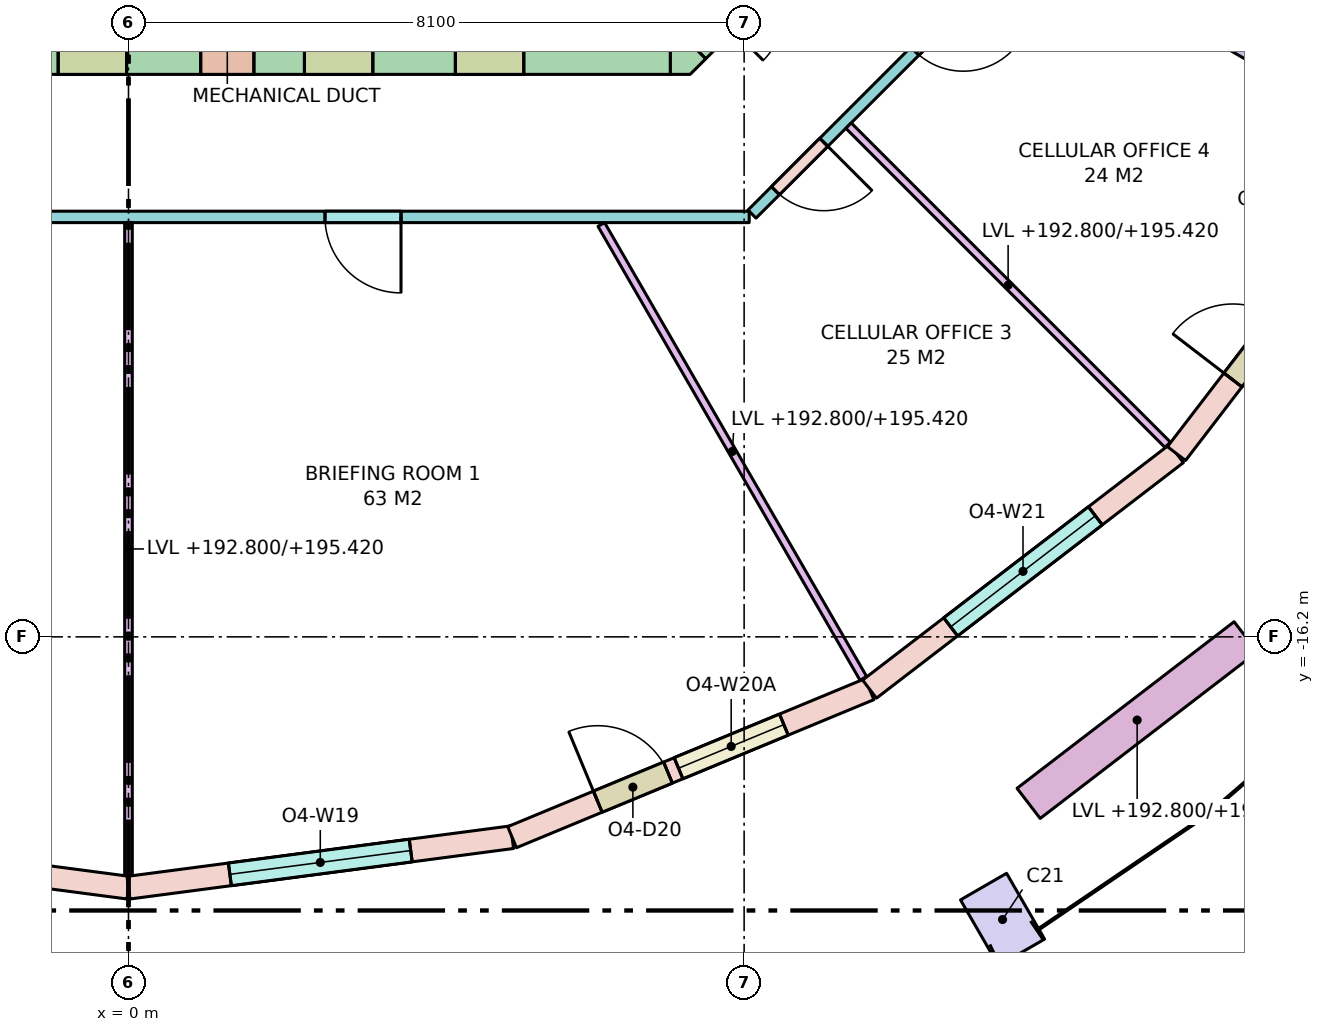
"""IFC4 building model, lengths in metres.
Left out: names, types, materials, properties, quantities, classifications, styles, units other than length and angle.
Written with IfcOpenShell. Run it as: python <this file> out.ifc"""

import sys

from ifc_helpers import new_model, si_unit, direction, frame, frame_2d, origin, origin_2d, place, context, subcontext, project, spatial, polyline, rectangle, outline, extrude, element, fill, save


model = new_model("IFC4")
c1 = context("Model", 3, precision=1e-05, world=origin(), true_north=direction((0.0, 1.0)))
c2 = subcontext(c1, "Body", "Model", "MODEL_VIEW")
j1 = project(units=[si_unit("LENGTHUNIT", "METRE"), si_unit("PLANEANGLEUNIT", "RADIAN")], contexts=[c1])
p1 = place(None, origin())
s1 = spatial("IfcSite", under=j1, at=p1, CompositionType="ELEMENT")
p2 = place(p1, origin())
s2 = spatial("IfcBuilding", under=s1, at=p2, CompositionType="ELEMENT")
p3 = place(p2, frame((0.0, 0.0, 192.8)))
s3 = spatial("IfcBuildingStorey", under=s2, at=p3, CompositionType="ELEMENT", Elevation=192.8)
p4 = place(p3, frame((11.5, -19.919, 0.0), z_axis=(0.0, 0.0, 1.0), x_axis=(0.866025403784, 0.5, 0.0)))
e1 = element("IfcColumn", 1, at=p4, inside=s3, PredefinedType="COLUMN", context=c2, shape_type="SweptSolid", body=[
    extrude(rectangle(XDim=0.7, YDim=1.0, at=origin_2d()), origin(), (0.0, 0.0, 1.0), 3.7),
])
p5 = place(p3, frame((-7.13, -8.45, -0.28), z_axis=(0.0, 0.0, 1.0), x_axis=(1.0, 0.0, 0.0)))
e2 = element("IfcWall", 2, at=p5, inside=s3, PredefinedType="SHEAR", context=c2, shape_type="SweptSolid", body=[
    extrude(rectangle(XDim=14.26, YDim=0.7, at=frame_2d((7.13, 0.0))), origin(), (0.0, 0.0, 1.0), 3.7),
])
p6 = place(p5, frame((8.08, 0.0, 0.28)))
e3 = element("IfcOpeningElement", 3, at=p6, cuts=e2, PredefinedType="OPENING", context=c2, shape_type="SweptSolid", body=[
    extrude(rectangle(XDim=0.7, YDim=2.1, at=frame_2d((0.35, 1.05))), frame((0.0, 0.36, 0.0), z_axis=(0.0, -1.0, 0.0), x_axis=(1.0, 0.0, 0.0)), (0.0, 0.0, 1.0), 0.72),
])
p7 = place(p5, frame((6.205, 0.0, 0.28)))
e4 = element("IfcOpeningElement", 4, at=p7, cuts=e2, PredefinedType="OPENING", context=c2, shape_type="SweptSolid", body=[
    extrude(rectangle(XDim=0.9, YDim=2.1, at=frame_2d((0.45, 1.05))), frame((0.0, 0.36, 0.0), z_axis=(0.0, -1.0, 0.0), x_axis=(1.0, 0.0, 0.0)), (0.0, 0.0, 1.0), 0.72),
])
p8 = place(p5, frame((9.445, 0.0, 0.28)))
e5 = element("IfcOpeningElement", 5, at=p8, cuts=e2, PredefinedType="OPENING", context=c2, shape_type="SweptSolid", body=[
    extrude(rectangle(XDim=0.9, YDim=2.1, at=frame_2d((0.45, 1.05))), frame((0.0, 0.36, 0.0), z_axis=(0.0, -1.0, 0.0), x_axis=(1.0, 0.0, 0.0)), (0.0, 0.0, 1.0), 0.72),
])
p9 = place(p5, frame((11.431, 0.0, 0.28)))
e6 = element("IfcOpeningElement", 6, at=p9, cuts=e2, PredefinedType="OPENING", context=c2, shape_type="SweptSolid", body=[
    extrude(rectangle(XDim=0.9, YDim=2.1, at=frame_2d((0.45, 1.05))), frame((0.0, 0.36, 0.0), z_axis=(0.0, -1.0, 0.0), x_axis=(1.0, 0.0, 0.0)), (0.0, 0.0, 1.0), 0.72),
])
p10 = place(p3, frame((10.347, -5.347, -0.28), z_axis=(0.0, 0.0, 1.0), x_axis=(-0.707106781187, -0.707106781187, 0.0)))
e7 = element("IfcWall", 7, at=p10, inside=s3, PredefinedType="SHEAR", context=c2, shape_type="SweptSolid", body=[
    extrude(rectangle(XDim=4.243, YDim=0.7, at=frame_2d((2.121, 0.0))), origin(), (0.0, 0.0, 1.0), 3.7),
])
p11 = place(p10, frame((2.823, 0.0, 0.28)))
e8 = element("IfcOpeningElement", 8, at=p11, cuts=e7, PredefinedType="OPENING", context=c2, shape_type="SweptSolid", body=[
    extrude(rectangle(XDim=0.9, YDim=2.1, at=frame_2d((0.45, 1.05))), frame((0.0, 0.36, 0.0), z_axis=(0.0, -1.0, 0.0), x_axis=(1.0, 0.0, 0.0)), (0.0, 0.0, 1.0), 0.72),
])
p12 = place(p10, frame((0.52, 0.0, 0.28)))
e9 = element("IfcOpeningElement", 9, at=p12, cuts=e7, PredefinedType="OPENING", context=c2, shape_type="SweptSolid", body=[
    extrude(rectangle(XDim=0.9, YDim=2.1, at=frame_2d((0.45, 1.05))), frame((0.0, 0.36, 0.0), z_axis=(0.0, -1.0, 0.0), x_axis=(1.0, 0.0, 0.0)), (0.0, 0.0, 1.0), 0.72),
])
p13 = place(p3, frame((0.0, 0.0, -0.28)))
e10 = element("IfcWall", 10, at=p13, inside=s3, PredefinedType="SHEAR", context=c2, shape_type="SweptSolid", body=[
    extrude(outline(polyline([(7.39, -8.8), (7.13, -8.8), (7.13, -8.8), (7.13, -8.13), (7.595, -8.595), (7.595, -8.595), (7.595, -8.595), (7.39, -8.8)])), origin(), (0.0, 0.0, 1.0), 3.7),
])
p14 = place(p3, frame((-5.047, -18.836, 0.0), z_axis=(0.0, 0.0, 1.0), x_axis=(0.99144890792, -0.130495451964, 0.0)))
e11 = element("IfcWall", 11, at=p14, inside=s3, PredefinedType="STANDARD", context=c2, shape_type="SweptSolid", body=[
    extrude(rectangle(XDim=5.091, YDim=0.3, at=frame_2d((2.545, 0.0))), origin(), (0.0, 0.0, 1.0), 3.42),
])
p15 = place(p14, frame((1.22, 0.0, 0.0)))
e12 = element("IfcOpeningElement", 12, at=p15, cuts=e11, PredefinedType="OPENING", context=c2, shape_type="SweptSolid", body=[
    extrude(rectangle(XDim=1.0, YDim=2.4, at=frame_2d((0.5, 1.2))), frame((0.0, 0.16, 0.0), z_axis=(0.0, -1.0, 0.0), x_axis=(1.0, 0.0, 0.0)), (0.0, 0.0, 1.0), 0.32),
])
p16 = place(p14, frame((2.37, 0.0, 0.8)))
e13 = element("IfcOpeningElement", 13, at=p16, cuts=e11, PredefinedType="OPENING", context=c2, shape_type="SweptSolid", body=[
    extrude(rectangle(XDim=1.5, YDim=2.4, at=frame_2d((0.75, 1.2))), frame((0.0, 0.16, 0.0), z_axis=(0.0, -1.0, 0.0), x_axis=(1.0, 0.0, 0.0)), (0.0, 0.0, 1.0), 0.32),
])
p17 = place(p3, frame((0.0, -19.5, 0.0), z_axis=(0.0, 0.0, 1.0), x_axis=(0.99144890792, 0.130495451964, 0.0)))
e14 = element("IfcWall", 14, at=p17, inside=s3, PredefinedType="STANDARD", context=c2, shape_type="SweptSolid", body=[
    extrude(rectangle(XDim=5.091, YDim=0.3, at=frame_2d((2.545, 0.0))), origin(), (0.0, 0.0, 1.0), 3.42),
])
p18 = place(p17, frame((1.345, 0.0, 0.8)))
e15 = element("IfcOpeningElement", 15, at=p18, cuts=e14, PredefinedType="OPENING", context=c2, shape_type="SweptSolid", body=[
    extrude(rectangle(XDim=2.4, YDim=2.4, at=frame_2d((1.2, 1.2))), frame((0.0, 0.16, 0.0), z_axis=(0.0, -1.0, 0.0), x_axis=(1.0, 0.0, 0.0)), (0.0, 0.0, 1.0), 0.32),
])
p19 = place(p3, frame((5.047, -18.836, 0.0), z_axis=(0.0, 0.0, 1.0), x_axis=(0.923862504675, 0.382724538613, 0.0)))
e16 = element("IfcWall", 16, at=p19, inside=s3, PredefinedType="STANDARD", context=c2, shape_type="SweptSolid", body=[
    extrude(rectangle(XDim=5.091, YDim=0.3, at=frame_2d((2.545, 0.0))), origin(), (0.0, 0.0, 1.0), 3.42),
])
p20 = place(p19, frame((1.22, 0.0, 0.0)))
e17 = element("IfcOpeningElement", 17, at=p20, cuts=e16, PredefinedType="OPENING", context=c2, shape_type="SweptSolid", body=[
    extrude(rectangle(XDim=1.0, YDim=2.4, at=frame_2d((0.5, 1.2))), frame((0.0, 0.16, 0.0), z_axis=(0.0, -1.0, 0.0), x_axis=(1.0, 0.0, 0.0)), (0.0, 0.0, 1.0), 0.32),
])
p21 = place(p19, frame((2.37, 0.0, 0.8)))
e18 = element("IfcOpeningElement", 18, at=p21, cuts=e16, PredefinedType="OPENING", context=c2, shape_type="SweptSolid", body=[
    extrude(rectangle(XDim=1.5, YDim=2.4, at=frame_2d((0.75, 1.2))), frame((0.0, 0.16, 0.0), z_axis=(0.0, -1.0, 0.0), x_axis=(1.0, 0.0, 0.0)), (0.0, 0.0, 1.0), 0.32),
])
p22 = place(p3, frame((9.75, -16.887, 0.0), z_axis=(0.0, 0.0, 1.0), x_axis=(0.79335619014, 0.608757714995, 0.0)))
e19 = element("IfcWall", 19, at=p22, inside=s3, PredefinedType="STANDARD", context=c2, shape_type="SweptSolid", body=[
    extrude(rectangle(XDim=5.091, YDim=0.3, at=frame_2d((2.545, 0.0))), origin(), (0.0, 0.0, 1.0), 3.42),
])
p23 = place(p22, frame((1.345, 0.0, 0.8)))
e20 = element("IfcOpeningElement", 20, at=p23, cuts=e19, PredefinedType="OPENING", context=c2, shape_type="SweptSolid", body=[
    extrude(rectangle(XDim=2.4, YDim=2.4, at=frame_2d((1.2, 1.2))), frame((0.0, 0.16, 0.0), z_axis=(0.0, -1.0, 0.0), x_axis=(1.0, 0.0, 0.0)), (0.0, 0.0, 1.0), 0.32),
])
p24 = place(p3, frame((13.789, -13.789, 0.0), z_axis=(0.0, 0.0, 1.0), x_axis=(0.608757714995, 0.79335619014, 0.0)))
e21 = element("IfcWall", 21, at=p24, inside=s3, PredefinedType="STANDARD", context=c2, shape_type="SweptSolid", body=[
    extrude(rectangle(XDim=5.091, YDim=0.3, at=frame_2d((2.545, 0.0))), origin(), (0.0, 0.0, 1.0), 3.42),
])
p25 = place(p24, frame((1.22, 0.0, 0.0)))
e22 = element("IfcOpeningElement", 22, at=p25, cuts=e21, PredefinedType="OPENING", context=c2, shape_type="SweptSolid", body=[
    extrude(rectangle(XDim=1.0, YDim=2.4, at=frame_2d((0.5, 1.2))), frame((0.0, 0.16, 0.0), z_axis=(0.0, -1.0, 0.0), x_axis=(1.0, 0.0, 0.0)), (0.0, 0.0, 1.0), 0.32),
])
p26 = place(p24, frame((2.37, 0.0, 0.8)))
e23 = element("IfcOpeningElement", 23, at=p26, cuts=e21, PredefinedType="OPENING", context=c2, shape_type="SweptSolid", body=[
    extrude(rectangle(XDim=1.5, YDim=2.4, at=frame_2d((0.75, 1.2))), frame((0.0, 0.16, 0.0), z_axis=(0.0, -1.0, 0.0), x_axis=(1.0, 0.0, 0.0)), (0.0, 0.0, 1.0), 0.32),
])
p27 = place(p3, frame((11.843, -18.391, 0.0), z_axis=(0.0, 0.0, 1.0), x_axis=(0.793326845617, 0.608795955984, 0.0)))
e24 = element("IfcWall", 24, at=p27, inside=s3, PredefinedType="PARAPET", context=c2, shape_type="SweptSolid", body=[
    extrude(rectangle(XDim=3.6, YDim=0.5, at=frame_2d((1.8, 0.0))), origin(), (0.0, 0.0, 1.0), 0.9),
])
p28 = place(p3, frame((11.945, -6.896, 0.0), z_axis=(0.0, 0.0, 1.0), x_axis=(-0.707106781187, -0.707106781187, 0.0)))
e25 = element("IfcWall", 25, at=p28, inside=s3, PredefinedType="PARTITIONING", context=c2, shape_type="SweptSolid", body=[
    extrude(rectangle(XDim=5.291, YDim=0.15, at=frame_2d((2.646, 0.0))), origin(), (0.0, 0.0, 1.0), 2.62),
])
p29 = place(p28, frame((3.956, 0.0, 0.0)))
e26 = element("IfcOpeningElement", 26, at=p29, cuts=e25, PredefinedType="OPENING", context=c2, shape_type="SweptSolid", body=[
    extrude(rectangle(XDim=0.9, YDim=2.1, at=frame_2d((0.45, 1.05))), frame((0.0, 0.085, 0.0), z_axis=(0.0, -1.0, 0.0), x_axis=(1.0, 0.0, 0.0)), (0.0, 0.0, 1.0), 0.17),
])
p30 = place(p28, frame((1.36, 0.0, 0.0)))
e27 = element("IfcOpeningElement", 27, at=p30, cuts=e25, PredefinedType="OPENING", context=c2, shape_type="SweptSolid", body=[
    extrude(rectangle(XDim=0.9, YDim=2.1, at=frame_2d((0.45, 1.05))), frame((0.0, 0.085, 0.0), z_axis=(0.0, -1.0, 0.0), x_axis=(1.0, 0.0, 0.0)), (0.0, 0.0, 1.0), 0.17),
])
p31 = place(p3, frame((8.167, -10.675, 0.0), z_axis=(0.0, 0.0, 1.0), x_axis=(-1.0, 0.0, 0.0)))
e28 = element("IfcWall", 28, at=p31, inside=s3, PredefinedType="PARTITIONING", context=c2, shape_type="SweptSolid", body=[
    extrude(rectangle(XDim=16.333, YDim=0.15, at=frame_2d((8.167, 0.0))), origin(), (0.0, 0.0, 1.0), 2.62),
])
p32 = place(p31, frame((11.325, 0.0, 0.0)))
e29 = element("IfcOpeningElement", 29, at=p32, cuts=e28, PredefinedType="OPENING", context=c2, shape_type="SweptSolid", body=[
    extrude(rectangle(XDim=1.8, YDim=2.1, at=frame_2d((0.9, 1.05))), frame((0.0, 0.085, 0.0), z_axis=(0.0, -1.0, 0.0), x_axis=(1.0, 0.0, 0.0)), (0.0, 0.0, 1.0), 0.17),
])
p33 = place(p31, frame((4.581, 0.0, 0.0)))
e30 = element("IfcOpeningElement", 30, at=p33, cuts=e28, PredefinedType="OPENING", context=c2, shape_type="SweptSolid", body=[
    extrude(rectangle(XDim=1.0, YDim=2.1, at=frame_2d((0.5, 1.05))), frame((0.0, 0.085, 0.0), z_axis=(0.0, -1.0, 0.0), x_axis=(1.0, 0.0, 0.0)), (0.0, 0.0, 1.0), 0.17),
])
p34 = place(p3, frame((0.0, -10.75, 0.0), z_axis=(0.0, 0.0, 1.0), x_axis=(0.0, -1.0, 0.0)))
e31 = element("IfcWall", 31, at=p34, inside=s3, PredefinedType="PARTITIONING", context=c2, shape_type="SweptSolid", body=[
    extrude(rectangle(XDim=8.587, YDim=0.1, at=frame_2d((4.293, 0.0))), origin(), (0.0, 0.0, 1.0), 2.62),
])
p35 = place(p3, frame((6.221, -10.775, 0.0), z_axis=(0.0, 0.0, 1.0), x_axis=(0.500015661236, -0.866016361577, 0.0)))
e32 = element("IfcWall", 32, at=p35, inside=s3, PredefinedType="PARTITIONING", context=c2, shape_type="SweptSolid", body=[
    extrude(rectangle(XDim=6.895, YDim=0.1, at=frame_2d((3.448, 0.0))), origin(), (0.0, 0.0, 1.0), 2.62),
])
p36 = place(p3, frame((9.474, -9.474, 0.0), z_axis=(0.0, 0.0, 1.0), x_axis=(0.707106781187, -0.707106781187, 0.0)))
e33 = element("IfcWall", 33, at=p36, inside=s3, PredefinedType="PARTITIONING", context=c2, shape_type="SweptSolid", body=[
    extrude(rectangle(XDim=5.938, YDim=0.1, at=frame_2d((2.969, 0.0))), origin(), (0.0, 0.0, 1.0), 2.62),
])
p37 = place(p3, frame((12.058, -6.961, 0.0), z_axis=(0.0, 0.0, 1.0), x_axis=(0.86601436245, -0.500019123664, 0.0)))
e34 = element("IfcWall", 34, at=p37, inside=s3, PredefinedType="PARTITIONING", context=c2, shape_type="SweptSolid", body=[
    extrude(rectangle(XDim=5.414, YDim=0.2, at=frame_2d((2.707, 0.0))), origin(), (0.0, 0.0, 1.0), 2.62),
])
p38 = place(p18, origin())
e35 = element("IfcWindow", 35, at=p38, inside=s3, PartitioningType="SINGLE_PANEL", PredefinedType="WINDOW", context=c2, shape_type="SweptSolid", body=[
    extrude(rectangle(XDim=2.4, YDim=2.4, at=frame_2d((1.2, 1.2))), frame((0.0, 0.03, 0.0), z_axis=(0.0, -1.0, 0.0), x_axis=(1.0, 0.0, 0.0)), (0.0, 0.0, 1.0), 0.06),
])
fill(e15, e35)
p39 = place(p20, origin())
e36 = element("IfcDoor", 36, at=p39, inside=s3, OperationType="SINGLE_SWING_LEFT", PredefinedType="DOOR", context=c2, shape_type="SweptSolid", body=[
    extrude(rectangle(XDim=1.0, YDim=2.4, at=frame_2d((0.5, 1.2))), frame((0.0, 0.025, 0.0), z_axis=(0.0, -1.0, 0.0), x_axis=(1.0, 0.0, 0.0)), (0.0, 0.0, 1.0), 0.05),
])
fill(e17, e36)
p40 = place(p21, origin())
e37 = element("IfcWindow", 37, at=p40, inside=s3, PartitioningType="SINGLE_PANEL", PredefinedType="WINDOW", context=c2, shape_type="SweptSolid", body=[
    extrude(rectangle(XDim=1.5, YDim=2.4, at=frame_2d((0.75, 1.2))), frame((0.0, 0.03, 0.0), z_axis=(0.0, -1.0, 0.0), x_axis=(1.0, 0.0, 0.0)), (0.0, 0.0, 1.0), 0.06),
])
fill(e18, e37)
p41 = place(p23, origin())
e38 = element("IfcWindow", 38, at=p41, inside=s3, PartitioningType="SINGLE_PANEL", PredefinedType="WINDOW", context=c2, shape_type="SweptSolid", body=[
    extrude(rectangle(XDim=2.4, YDim=2.4, at=frame_2d((1.2, 1.2))), frame((0.0, 0.03, 0.0), z_axis=(0.0, -1.0, 0.0), x_axis=(1.0, 0.0, 0.0)), (0.0, 0.0, 1.0), 0.06),
])
fill(e20, e38)
p42 = place(p25, origin())
e39 = element("IfcDoor", 39, at=p42, inside=s3, OperationType="SINGLE_SWING_LEFT", PredefinedType="DOOR", context=c2, shape_type="SweptSolid", body=[
    extrude(rectangle(XDim=1.0, YDim=2.4, at=frame_2d((0.5, 1.2))), frame((0.0, 0.025, 0.0), z_axis=(0.0, -1.0, 0.0), x_axis=(1.0, 0.0, 0.0)), (0.0, 0.0, 1.0), 0.05),
])
fill(e22, e39)
p43 = place(p33, origin())
e40 = element("IfcDoor", 40, at=p43, inside=s3, OperationType="SINGLE_SWING_LEFT", PredefinedType="DOOR", context=c2, shape_type="SweptSolid", body=[
    extrude(rectangle(XDim=1.0, YDim=2.1, at=frame_2d((0.5, 1.05))), frame((0.0, 0.025, 0.0), z_axis=(0.0, -1.0, 0.0), x_axis=(1.0, 0.0, 0.0)), (0.0, 0.0, 1.0), 0.05),
])
fill(e30, e40)
p44 = place(p29, origin())
e41 = element("IfcDoor", 41, at=p44, inside=s3, OperationType="SINGLE_SWING_LEFT", PredefinedType="DOOR", context=c2, shape_type="SweptSolid", body=[
    extrude(rectangle(XDim=0.9, YDim=2.1, at=frame_2d((0.45, 1.05))), frame((0.0, 0.025, 0.0), z_axis=(0.0, -1.0, 0.0), x_axis=(1.0, 0.0, 0.0)), (0.0, 0.0, 1.0), 0.05),
])
fill(e26, e41)
p45 = place(p30, origin())
e42 = element("IfcDoor", 42, at=p45, inside=s3, OperationType="SINGLE_SWING_LEFT", PredefinedType="DOOR", context=c2, shape_type="SweptSolid", body=[
    extrude(rectangle(XDim=0.9, YDim=2.1, at=frame_2d((0.45, 1.05))), frame((0.0, 0.025, 0.0), z_axis=(0.0, -1.0, 0.0), x_axis=(1.0, 0.0, 0.0)), (0.0, 0.0, 1.0), 0.05),
])
fill(e27, e42)
save(model, sys.argv[1])
